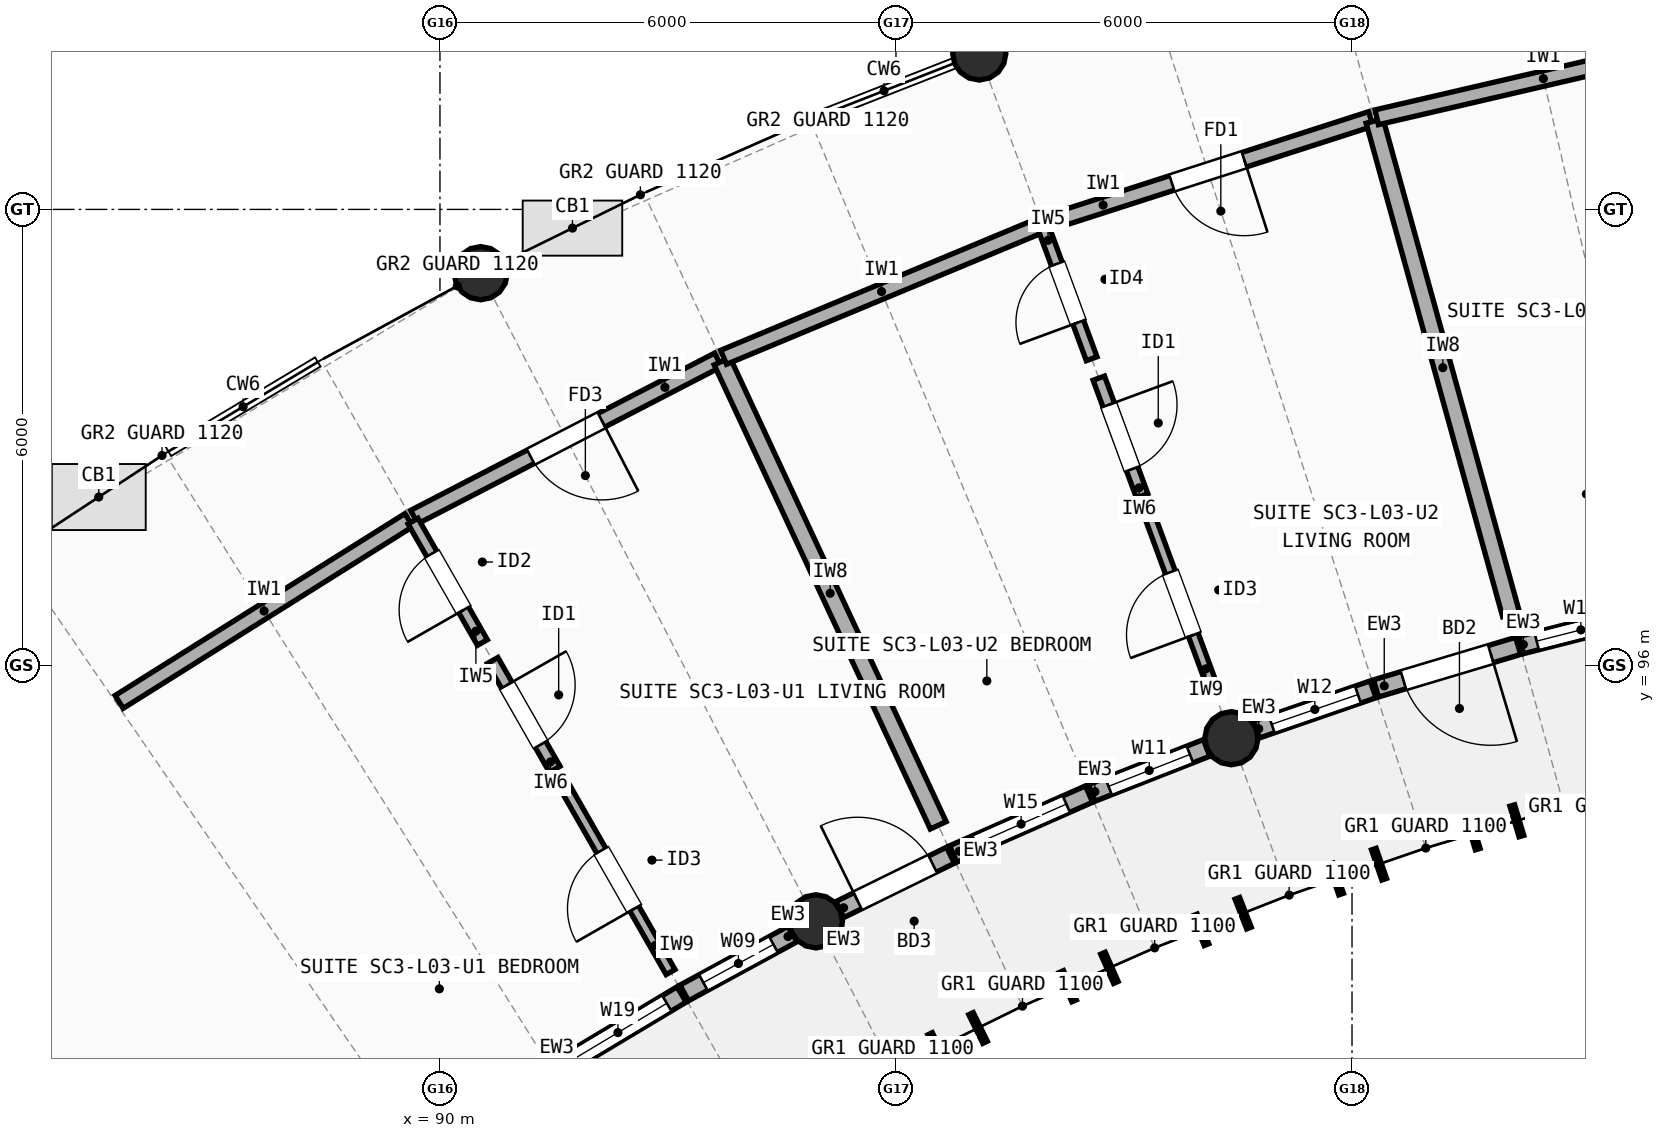
"""IFC4 building model, lengths in metres.
Left out: names, types, materials, properties, quantities, classifications, styles, units other than length and angle.
Written with IfcOpenShell. Run it as: python <this file> out.ifc"""

import sys

from ifc_helpers import new_model, si_unit, direction, frame, frame_2d, origin, origin_2d, place, context, subcontext, project, spatial, rectangle, circle, extrude, element, fill, save


model = new_model("IFC4")
c1 = context("Model", 3, precision=1e-05, world=origin(), true_north=direction((0.0, 1.0)))
c2 = subcontext(c1, "Body", "Model", "MODEL_VIEW")
j1 = project(units=[si_unit("LENGTHUNIT", "METRE"), si_unit("PLANEANGLEUNIT", "RADIAN")], contexts=[c1])
p1 = place(None, origin())
s1 = spatial("IfcSite", under=j1, at=p1, CompositionType="ELEMENT")
p2 = place(p1, origin())
s2 = spatial("IfcBuilding", under=s1, at=p2, CompositionType="ELEMENT")
p3 = place(p2, frame((0.0, 0.0, 10.9)))
s3 = spatial("IfcBuildingStorey", under=s2, at=p3, CompositionType="ELEMENT", Elevation=10.9)
for number, where, z_axis, x_axis in (
    (1, (94.947, 92.634, 0.0), (0.0, 0.0, 1.0), (1.0, 0.0, 0.0)),
    (2, (90.536, 101.161, 0.0), (0.0, 0.0, 1.0), (1.0, 0.0, 0.0)),
    (3, (100.413, 95.043, 0.0), (0.0, 0.0, 1.0), (1.0, 0.0, 0.0)),
    (4, (97.095, 104.052, 0.0), (0.0, 0.0, 1.0), (1.0, 0.0, 0.0)),
):
    element("IfcColumn", number, at=place(p3, frame(where, z_axis=z_axis, x_axis=x_axis)), inside=s3, PredefinedType="COLUMN", context=c2, shape_type="SweptSolid", body=[
        extrude(circle(Radius=0.35, at=origin_2d()), origin(), (0.0, 0.0, 1.0), 2.948),
    ])
p4 = place(p3, frame((91.504, 90.668, 0.0), z_axis=(0.0, 0.0, 1.0), x_axis=(0.85787888411, 0.51385194385, 0.0)))
e5 = element("IfcWall", 5, at=p4, inside=s3, PredefinedType="STANDARD", context=c2, shape_type="SweptSolid", body=[
    extrude(rectangle(XDim=1.952, YDim=0.235, at=frame_2d((0.976, 0.0))), origin(), (0.0, 0.0, 1.0), 2.684),
])
p5 = place(p4, frame((0.226, 0.0, 0.85)))
e6 = element("IfcOpeningElement", 6, at=p5, cuts=e5, PredefinedType="OPENING", context=c2, shape_type="SweptSolid", body=[
    extrude(rectangle(XDim=1.5, YDim=1.5, at=frame_2d((0.75, 0.75))), frame((0.0, 0.127, 0.0), z_axis=(0.0, -1.0, 0.0), x_axis=(1.0, 0.0, 0.0)), (0.0, 0.0, 1.0), 0.255),
])
p6 = place(p3, frame((93.214, 91.692, 0.0), z_axis=(0.0, 0.0, 1.0), x_axis=(0.878452871629, 0.477828999044, 0.0)))
e7 = element("IfcWall", 7, at=p6, inside=s3, PredefinedType="STANDARD", context=c2, shape_type="SweptSolid", body=[
    extrude(rectangle(XDim=1.622, YDim=0.235, at=frame_2d((0.811, 0.0))), origin(), (0.0, 0.0, 1.0), 2.684),
])
p7 = place(p6, frame((0.286, 0.0, 0.85)))
e8 = element("IfcOpeningElement", 8, at=p7, cuts=e7, PredefinedType="OPENING", context=c2, shape_type="SweptSolid", body=[
    extrude(rectangle(XDim=1.05, YDim=1.35, at=frame_2d((0.525, 0.675))), frame((0.0, 0.127, 0.0), z_axis=(0.0, -1.0, 0.0), x_axis=(1.0, 0.0, 0.0)), (0.0, 0.0, 1.0), 0.255),
])
p8 = place(p3, frame((95.261, 92.788, 0.0), z_axis=(0.0, 0.0, 1.0), x_axis=(0.897535518759, 0.440942164649, 0.0)))
e9 = element("IfcWall", 9, at=p8, inside=s3, PredefinedType="STANDARD", context=c2, shape_type="SweptSolid", body=[
    extrude(rectangle(XDim=1.622, YDim=0.235, at=frame_2d((0.811, 0.0))), origin(), (0.0, 0.0, 1.0), 2.684),
])
p9 = place(p8, frame((0.261, 0.0, 0.0)))
e10 = element("IfcOpeningElement", 10, at=p9, cuts=e9, PredefinedType="OPENING", context=c2, shape_type="SweptSolid", body=[
    extrude(rectangle(XDim=1.1, YDim=2.15, at=frame_2d((0.55, 1.075))), frame((0.0, 0.127, 0.0), z_axis=(0.0, -1.0, 0.0), x_axis=(1.0, 0.0, 0.0)), (0.0, 0.0, 1.0), 0.255),
])
p10 = place(p3, frame((96.753, 93.521, 0.0), z_axis=(0.0, 0.0, 1.0), x_axis=(0.915126852478, 0.403166025197, 0.0)))
e11 = element("IfcWall", 11, at=p10, inside=s3, PredefinedType="STANDARD", context=c2, shape_type="SweptSolid", body=[
    extrude(rectangle(XDim=1.952, YDim=0.235, at=frame_2d((0.976, 0.0))), origin(), (0.0, 0.0, 1.0), 2.684),
])
p11 = place(p10, frame((0.326, 0.0, 0.85)))
e12 = element("IfcOpeningElement", 12, at=p11, cuts=e11, PredefinedType="OPENING", context=c2, shape_type="SweptSolid", body=[
    extrude(rectangle(XDim=1.3, YDim=1.45, at=frame_2d((0.65, 0.725))), frame((0.0, 0.127, 0.0), z_axis=(0.0, -1.0, 0.0), x_axis=(1.0, 0.0, 0.0)), (0.0, 0.0, 1.0), 0.255),
])
p12 = place(p3, frame((98.577, 94.323, 0.0), z_axis=(0.0, 0.0, 1.0), x_axis=(0.930967180533, 0.365102874228, 0.0)))
e13 = element("IfcWall", 13, at=p12, inside=s3, PredefinedType="STANDARD", context=c2, shape_type="SweptSolid", body=[
    extrude(rectangle(XDim=1.622, YDim=0.235, at=frame_2d((0.811, 0.0))), origin(), (0.0, 0.0, 1.0), 2.684),
])
p13 = place(p12, frame((0.236, 0.0, 0.85)))
e14 = element("IfcOpeningElement", 14, at=p13, cuts=e13, PredefinedType="OPENING", context=c2, shape_type="SweptSolid", body=[
    extrude(rectangle(XDim=1.15, YDim=1.45, at=frame_2d((0.575, 0.725))), frame((0.0, 0.127, 0.0), z_axis=(0.0, -1.0, 0.0), x_axis=(1.0, 0.0, 0.0)), (0.0, 0.0, 1.0), 0.255),
])
p14 = place(p3, frame((100.744, 95.157, 0.0), z_axis=(0.0, 0.0, 1.0), x_axis=(0.945336194352, 0.32609734689, 0.0)))
e15 = element("IfcWall", 15, at=p14, inside=s3, PredefinedType="STANDARD", context=c2, shape_type="SweptSolid", body=[
    extrude(rectangle(XDim=1.622, YDim=0.235, at=frame_2d((0.811, 0.0))), origin(), (0.0, 0.0, 1.0), 2.684),
])
p15 = place(p14, frame((0.211, 0.0, 0.85)))
e16 = element("IfcOpeningElement", 16, at=p15, cuts=e15, PredefinedType="OPENING", context=c2, shape_type="SweptSolid", body=[
    extrude(rectangle(XDim=1.2, YDim=1.35, at=frame_2d((0.6, 0.675))), frame((0.0, 0.127, 0.0), z_axis=(0.0, -1.0, 0.0), x_axis=(1.0, 0.0, 0.0)), (0.0, 0.0, 1.0), 0.255),
])
p16 = place(p3, frame((102.316, 95.698, 0.0), z_axis=(0.0, 0.0, 1.0), x_axis=(0.95807718441, 0.286510224446, 0.0)))
e17 = element("IfcWall", 17, at=p16, inside=s3, PredefinedType="STANDARD", context=c2, shape_type="SweptSolid", body=[
    extrude(rectangle(XDim=1.952, YDim=0.235, at=frame_2d((0.976, 0.0))), origin(), (0.0, 0.0, 1.0), 2.684),
])
p17 = place(p16, frame((0.376, 0.0, 0.0)))
e18 = element("IfcOpeningElement", 18, at=p17, cuts=e17, PredefinedType="OPENING", context=c2, shape_type="SweptSolid", body=[
    extrude(rectangle(XDim=1.2, YDim=2.15, at=frame_2d((0.6, 1.075))), frame((0.0, 0.127, 0.0), z_axis=(0.0, -1.0, 0.0), x_axis=(1.0, 0.0, 0.0)), (0.0, 0.0, 1.0), 0.255),
])
p18 = place(p3, frame((104.225, 96.268, 0.0), z_axis=(0.0, 0.0, 1.0), x_axis=(0.969152085663, 0.246463455413, 0.0)))
e19 = element("IfcWall", 19, at=p18, inside=s3, PredefinedType="STANDARD", context=c2, shape_type="SweptSolid", body=[
    extrude(rectangle(XDim=1.623, YDim=0.235, at=frame_2d((0.811, 0.0))), origin(), (0.0, 0.0, 1.0), 2.684),
])
p19 = place(p18, frame((0.211, 0.0, 0.85)))
e20 = element("IfcOpeningElement", 20, at=p19, cuts=e19, PredefinedType="OPENING", context=c2, shape_type="SweptSolid", body=[
    extrude(rectangle(XDim=1.2, YDim=1.45, at=frame_2d((0.6, 0.725))), frame((0.0, 0.127, 0.0), z_axis=(0.0, -1.0, 0.0), x_axis=(1.0, 0.0, 0.0)), (0.0, 0.0, 1.0), 0.255),
])
p20 = place(p3, frame((85.779, 95.521, 0.0), z_axis=(0.0, 0.0, 1.0), x_axis=(0.847037081085, 0.531533802563, 0.0)))
e21 = element("IfcWall", 21, at=p20, inside=s3, PredefinedType="SOLIDWALL", context=c2, shape_type="SweptSolid", body=[
    extrude(rectangle(XDim=4.501, YDim=0.2, at=frame_2d((2.25, 0.0))), origin(), (0.0, 0.0, 1.0), 2.722),
])
p21 = place(p3, frame((89.661, 97.953, 0.0), z_axis=(0.0, 0.0, 1.0), x_axis=(0.888203141908, 0.459450953536, 0.0)))
e22 = element("IfcWall", 22, at=p21, inside=s3, PredefinedType="SOLIDWALL", context=c2, shape_type="SweptSolid", body=[
    extrude(rectangle(XDim=4.501, YDim=0.2, at=frame_2d((2.25, 0.0))), origin(), (0.0, 0.0, 1.0), 2.762),
])
p22 = place(p21, frame((1.726, 0.0, 0.0)))
e23 = element("IfcOpeningElement", 23, at=p22, cuts=e22, PredefinedType="OPENING", context=c2, shape_type="SweptSolid", body=[
    extrude(rectangle(XDim=1.05, YDim=2.15, at=frame_2d((0.525, 1.075))), frame((0.0, 0.11, 0.0), z_axis=(0.0, -1.0, 0.0), x_axis=(1.0, 0.0, 0.0)), (0.0, 0.0, 1.0), 0.22),
])
p23 = place(p3, frame((93.034, 91.967, 0.0), z_axis=(0.0, 0.0, 1.0), x_axis=(-0.495951127449, 0.868350435701, 0.0)))
e24 = element("IfcWall", 24, at=p23, inside=s3, PredefinedType="PARTITIONING", context=c2, shape_type="SweptSolid", body=[
    extrude(rectangle(XDim=2.8, YDim=0.135, at=frame_2d((1.4, 0.0))), origin(), (0.0, 0.0, 1.0), 2.742),
])
p24 = place(p23, frame((0.96, 0.0, 0.0)))
e25 = element("IfcOpeningElement", 25, at=p24, cuts=e24, PredefinedType="OPENING", context=c2, shape_type="SweptSolid", body=[
    extrude(rectangle(XDim=0.88, YDim=2.1, at=frame_2d((0.44, 1.05))), frame((0.0, 0.077, 0.0), z_axis=(0.0, -1.0, 0.0), x_axis=(1.0, 0.0, 0.0)), (0.0, 0.0, 1.0), 0.155),
])
p25 = place(p3, frame((91.51, 94.635, 0.0), z_axis=(0.0, 0.0, 1.0), x_axis=(-0.49583578404, 0.868416302971, 0.0)))
e26 = element("IfcWall", 26, at=p25, inside=s3, PredefinedType="PLUMBINGWALL", context=c2, shape_type="SweptSolid", body=[
    extrude(rectangle(XDim=1.648, YDim=0.16, at=frame_2d((0.824, 0.0))), origin(), (0.0, 0.0, 1.0), 2.742),
])
p26 = place(p25, frame((0.374, 0.0, 0.0)))
e27 = element("IfcOpeningElement", 27, at=p26, cuts=e26, PredefinedType="OPENING", context=c2, shape_type="SweptSolid", body=[
    extrude(rectangle(XDim=0.9, YDim=2.1, at=frame_2d((0.45, 1.05))), frame((0.0, 0.09, 0.0), z_axis=(0.0, -1.0, 0.0), x_axis=(1.0, 0.0, 0.0)), (0.0, 0.0, 1.0), 0.18),
])
p27 = place(p3, frame((90.558, 96.302, 0.0), z_axis=(0.0, 0.0, 1.0), x_axis=(-0.495938892217, 0.868357423638, 0.0)))
e28 = element("IfcWall", 28, at=p27, inside=s3, PredefinedType="PARTITIONING", context=c2, shape_type="SweptSolid", body=[
    extrude(rectangle(XDim=1.84, YDim=0.15, at=frame_2d((0.92, 0.0))), origin(), (0.0, 0.0, 1.0), 2.742),
])
p28 = place(p27, frame((0.495, 0.0, 0.0)))
e29 = element("IfcOpeningElement", 29, at=p28, cuts=e28, PredefinedType="OPENING", context=c2, shape_type="SweptSolid", body=[
    extrude(rectangle(XDim=0.85, YDim=2.1, at=frame_2d((0.425, 1.05))), frame((0.0, 0.085, 0.0), z_axis=(0.0, -1.0, 0.0), x_axis=(1.0, 0.0, 0.0)), (0.0, 0.0, 1.0), 0.17),
])
p29 = place(p3, frame((96.556, 93.897, 0.0), z_axis=(0.0, 0.0, 1.0), x_axis=(-0.422206763189, 0.906499558256, 0.0)))
e30 = element("IfcWall", 30, at=p29, inside=s3, PredefinedType="SOLIDWALL", context=c2, shape_type="SweptSolid", body=[
    extrude(rectangle(XDim=6.736, YDim=0.23, at=frame_2d((3.368, 0.0))), origin(), (0.0, 0.0, 1.0), 2.722),
])
p30 = place(p3, frame((93.732, 100.055, 0.0), z_axis=(0.0, 0.0, 1.0), x_axis=(0.923267760269, 0.384157054925, 0.0)))
e31 = element("IfcWall", 31, at=p30, inside=s3, PredefinedType="SOLIDWALL", context=c2, shape_type="SweptSolid", body=[
    extrude(rectangle(XDim=4.501, YDim=0.2, at=frame_2d((2.251, 0.0))), origin(), (0.0, 0.0, 1.0), 2.742),
])
p31 = place(p3, frame((97.963, 101.812, 0.0), z_axis=(0.0, 0.0, 1.0), x_axis=(0.95193992138, 0.306284812035, 0.0)))
e32 = element("IfcWall", 32, at=p31, inside=s3, PredefinedType="SOLIDWALL", context=c2, shape_type="SweptSolid", body=[
    extrude(rectangle(XDim=4.501, YDim=0.2, at=frame_2d((2.25, 0.0))), origin(), (0.0, 0.0, 1.0), 2.722),
])
p32 = place(p31, frame((1.751, 0.0, 0.0)))
e33 = element("IfcOpeningElement", 33, at=p32, cuts=e32, PredefinedType="OPENING", context=c2, shape_type="SweptSolid", body=[
    extrude(rectangle(XDim=1.0, YDim=2.15, at=frame_2d((0.5, 1.075))), frame((0.0, 0.11, 0.0), z_axis=(0.0, -1.0, 0.0), x_axis=(1.0, 0.0, 0.0)), (0.0, 0.0, 1.0), 0.22),
])
p33 = place(p3, frame((100.189, 95.651, 0.0), z_axis=(0.0, 0.0, 1.0), x_axis=(-0.34555023948, 0.938400251489, 0.0)))
e34 = element("IfcWall", 34, at=p33, inside=s3, PredefinedType="PARTITIONING", context=c2, shape_type="SweptSolid", body=[
    extrude(rectangle(XDim=2.48, YDim=0.135, at=frame_2d((1.24, 0.0))), origin(), (0.0, 0.0, 1.0), 2.762),
])
p34 = place(p33, frame((0.8, 0.0, 0.0)))
e35 = element("IfcOpeningElement", 35, at=p34, cuts=e34, PredefinedType="OPENING", context=c2, shape_type="SweptSolid", body=[
    extrude(rectangle(XDim=0.88, YDim=2.1, at=frame_2d((0.44, 1.05))), frame((0.0, 0.077, 0.0), z_axis=(0.0, -1.0, 0.0), x_axis=(1.0, 0.0, 0.0)), (0.0, 0.0, 1.0), 0.155),
])
p35 = place(p3, frame((99.238, 98.233, 0.0), z_axis=(0.0, 0.0, 1.0), x_axis=(-0.345581795697, 0.938388630836, 0.0)))
e36 = element("IfcWall", 36, at=p35, inside=s3, PredefinedType="PLUMBINGWALL", context=c2, shape_type="SweptSolid", body=[
    extrude(rectangle(XDim=1.648, YDim=0.16, at=frame_2d((0.824, 0.0))), origin(), (0.0, 0.0, 1.0), 2.762),
])
p36 = place(p35, frame((0.374, 0.0, 0.0)))
e37 = element("IfcOpeningElement", 37, at=p36, cuts=e36, PredefinedType="OPENING", context=c2, shape_type="SweptSolid", body=[
    extrude(rectangle(XDim=0.9, YDim=2.1, at=frame_2d((0.45, 1.05))), frame((0.0, 0.09, 0.0), z_axis=(0.0, -1.0, 0.0), x_axis=(1.0, 0.0, 0.0)), (0.0, 0.0, 1.0), 0.18),
])
p37 = place(p3, frame((98.574, 100.035, 0.0), z_axis=(0.0, 0.0, 1.0), x_axis=(-0.345490154584, 0.938422374566, 0.0)))
e38 = element("IfcWall", 38, at=p37, inside=s3, PredefinedType="PARTITIONING", context=c2, shape_type="SweptSolid", body=[
    extrude(rectangle(XDim=1.84, YDim=0.15, at=frame_2d((0.92, 0.0))), origin(), (0.0, 0.0, 1.0), 2.762),
])
p38 = place(p37, frame((0.51, 0.0, 0.0)))
e39 = element("IfcOpeningElement", 39, at=p38, cuts=e38, PredefinedType="OPENING", context=c2, shape_type="SweptSolid", body=[
    extrude(rectangle(XDim=0.82, YDim=2.08, at=frame_2d((0.41, 1.04))), frame((0.0, 0.085, 0.0), z_axis=(0.0, -1.0, 0.0), x_axis=(1.0, 0.0, 0.0)), (0.0, 0.0, 1.0), 0.17),
])
p39 = place(p3, frame((104.092, 96.672, 0.0), z_axis=(0.0, 0.0, 1.0), x_axis=(-0.266578174631, 0.963813299768, 0.0)))
e40 = element("IfcWall", 40, at=p39, inside=s3, PredefinedType="SOLIDWALL", context=c2, shape_type="SweptSolid", body=[
    extrude(rectangle(XDim=6.736, YDim=0.23, at=frame_2d((3.368, 0.0))), origin(), (0.0, 0.0, 1.0), 2.742),
])
p40 = place(p3, frame((102.325, 103.212, 0.0), z_axis=(0.0, 0.0, 1.0), x_axis=(0.974052809246, 0.226320844821, 0.0)))
e41 = element("IfcWall", 41, at=p40, inside=s3, PredefinedType="SOLIDWALL", context=c2, shape_type="SweptSolid", body=[
    extrude(rectangle(XDim=4.501, YDim=0.2, at=frame_2d((2.251, 0.0))), origin(), (0.0, 0.0, 1.0), 2.762),
])
p41 = place(p5, origin())
e42 = element("IfcWindow", 42, at=p41, inside=s3, PartitioningType="SINGLE_PANEL", PredefinedType="WINDOW", context=c2, shape_type="SweptSolid", body=[
    extrude(rectangle(XDim=1.5, YDim=1.5, at=frame_2d((0.75, 0.75))), frame((0.0, 0.03, 0.0), z_axis=(0.0, -1.0, 0.0), x_axis=(1.0, 0.0, 0.0)), (0.0, 0.0, 1.0), 0.06),
])
fill(e6, e42)
p42 = place(p7, origin())
e43 = element("IfcWindow", 43, at=p42, inside=s3, PartitioningType="SINGLE_PANEL", PredefinedType="WINDOW", context=c2, shape_type="SweptSolid", body=[
    extrude(rectangle(XDim=1.05, YDim=1.35, at=frame_2d((0.525, 0.675))), frame((0.0, 0.03, 0.0), z_axis=(0.0, -1.0, 0.0), x_axis=(1.0, 0.0, 0.0)), (0.0, 0.0, 1.0), 0.06),
])
fill(e8, e43)
p43 = place(p9, frame((1.1, 0.0, 0.0), z_axis=(0.0, 0.0, 1.0), x_axis=(-1.0, 0.0, 0.0)))
e44 = element("IfcDoor", 44, at=p43, inside=s3, OperationType="SINGLE_SWING_LEFT", PredefinedType="DOOR", context=c2, shape_type="SweptSolid", body=[
    extrude(rectangle(XDim=1.1, YDim=2.15, at=frame_2d((0.55, 1.075))), frame((0.0, 0.025, 0.0), z_axis=(0.0, -1.0, 0.0), x_axis=(1.0, 0.0, 0.0)), (0.0, 0.0, 1.0), 0.05),
])
fill(e10, e44)
p44 = place(p11, origin())
e45 = element("IfcWindow", 45, at=p44, inside=s3, PartitioningType="SINGLE_PANEL", PredefinedType="WINDOW", context=c2, shape_type="SweptSolid", body=[
    extrude(rectangle(XDim=1.3, YDim=1.45, at=frame_2d((0.65, 0.725))), frame((0.0, 0.03, 0.0), z_axis=(0.0, -1.0, 0.0), x_axis=(1.0, 0.0, 0.0)), (0.0, 0.0, 1.0), 0.06),
])
fill(e12, e45)
p45 = place(p13, origin())
e46 = element("IfcWindow", 46, at=p45, inside=s3, PartitioningType="SINGLE_PANEL", PredefinedType="WINDOW", context=c2, shape_type="SweptSolid", body=[
    extrude(rectangle(XDim=1.15, YDim=1.45, at=frame_2d((0.575, 0.725))), frame((0.0, 0.03, 0.0), z_axis=(0.0, -1.0, 0.0), x_axis=(1.0, 0.0, 0.0)), (0.0, 0.0, 1.0), 0.06),
])
fill(e14, e46)
p46 = place(p15, origin())
e47 = element("IfcWindow", 47, at=p46, inside=s3, PartitioningType="SINGLE_PANEL", PredefinedType="WINDOW", context=c2, shape_type="SweptSolid", body=[
    extrude(rectangle(XDim=1.2, YDim=1.35, at=frame_2d((0.6, 0.675))), frame((0.0, 0.03, 0.0), z_axis=(0.0, -1.0, 0.0), x_axis=(1.0, 0.0, 0.0)), (0.0, 0.0, 1.0), 0.06),
])
fill(e16, e47)
p47 = place(p17, frame((1.2, 0.0, 0.0), z_axis=(0.0, 0.0, 1.0), x_axis=(-1.0, 0.0, 0.0)))
e48 = element("IfcDoor", 48, at=p47, inside=s3, OperationType="SINGLE_SWING_RIGHT", PredefinedType="DOOR", context=c2, shape_type="SweptSolid", body=[
    extrude(rectangle(XDim=1.2, YDim=2.15, at=frame_2d((0.6, 1.075))), frame((0.0, 0.025, 0.0), z_axis=(0.0, -1.0, 0.0), x_axis=(1.0, 0.0, 0.0)), (0.0, 0.0, 1.0), 0.05),
])
fill(e18, e48)
p48 = place(p19, origin())
e49 = element("IfcWindow", 49, at=p48, inside=s3, PartitioningType="SINGLE_PANEL", PredefinedType="WINDOW", context=c2, shape_type="SweptSolid", body=[
    extrude(rectangle(XDim=1.2, YDim=1.45, at=frame_2d((0.6, 0.725))), frame((0.0, 0.03, 0.0), z_axis=(0.0, -1.0, 0.0), x_axis=(1.0, 0.0, 0.0)), (0.0, 0.0, 1.0), 0.06),
])
fill(e20, e49)
p49 = place(p22, origin())
e50 = element("IfcDoor", 50, at=p49, inside=s3, OperationType="SINGLE_SWING_RIGHT", PredefinedType="DOOR", context=c2, shape_type="SweptSolid", body=[
    extrude(rectangle(XDim=1.05, YDim=2.15, at=frame_2d((0.525, 1.075))), frame((0.0, 0.025, 0.0), z_axis=(0.0, -1.0, 0.0), x_axis=(1.0, 0.0, 0.0)), (0.0, 0.0, 1.0), 0.05),
])
fill(e23, e50)
p50 = place(p24, origin())
e51 = element("IfcDoor", 51, at=p50, inside=s3, OperationType="SINGLE_SWING_LEFT", PredefinedType="DOOR", context=c2, shape_type="SweptSolid", body=[
    extrude(rectangle(XDim=0.88, YDim=2.1, at=frame_2d((0.44, 1.05))), frame((0.0, 0.025, 0.0), z_axis=(0.0, -1.0, 0.0), x_axis=(1.0, 0.0, 0.0)), (0.0, 0.0, 1.0), 0.05),
])
fill(e25, e51)
p51 = place(p26, origin())
e52 = element("IfcDoor", 52, at=p51, inside=s3, OperationType="SINGLE_SWING_RIGHT", PredefinedType="DOOR", context=c2, shape_type="SweptSolid", body=[
    extrude(rectangle(XDim=0.9, YDim=2.1, at=frame_2d((0.45, 1.05))), frame((0.0, 0.025, 0.0), z_axis=(0.0, -1.0, 0.0), x_axis=(1.0, 0.0, 0.0)), (0.0, 0.0, 1.0), 0.05),
])
fill(e27, e52)
p52 = place(p28, origin())
e53 = element("IfcDoor", 53, at=p52, inside=s3, OperationType="SINGLE_SWING_LEFT", PredefinedType="DOOR", context=c2, shape_type="SweptSolid", body=[
    extrude(rectangle(XDim=0.85, YDim=2.1, at=frame_2d((0.425, 1.05))), frame((0.0, 0.025, 0.0), z_axis=(0.0, -1.0, 0.0), x_axis=(1.0, 0.0, 0.0)), (0.0, 0.0, 1.0), 0.05),
])
fill(e29, e53)
p53 = place(p32, origin())
e54 = element("IfcDoor", 54, at=p53, inside=s3, OperationType="SINGLE_SWING_RIGHT", PredefinedType="DOOR", context=c2, shape_type="SweptSolid", body=[
    extrude(rectangle(XDim=1.0, YDim=2.15, at=frame_2d((0.5, 1.075))), frame((0.0, 0.025, 0.0), z_axis=(0.0, -1.0, 0.0), x_axis=(1.0, 0.0, 0.0)), (0.0, 0.0, 1.0), 0.05),
])
fill(e33, e54)
p54 = place(p34, origin())
e55 = element("IfcDoor", 55, at=p54, inside=s3, OperationType="SINGLE_SWING_LEFT", PredefinedType="DOOR", context=c2, shape_type="SweptSolid", body=[
    extrude(rectangle(XDim=0.88, YDim=2.1, at=frame_2d((0.44, 1.05))), frame((0.0, 0.025, 0.0), z_axis=(0.0, -1.0, 0.0), x_axis=(1.0, 0.0, 0.0)), (0.0, 0.0, 1.0), 0.05),
])
fill(e35, e55)
p55 = place(p36, origin())
e56 = element("IfcDoor", 56, at=p55, inside=s3, OperationType="SINGLE_SWING_RIGHT", PredefinedType="DOOR", context=c2, shape_type="SweptSolid", body=[
    extrude(rectangle(XDim=0.9, YDim=2.1, at=frame_2d((0.45, 1.05))), frame((0.0, 0.025, 0.0), z_axis=(0.0, -1.0, 0.0), x_axis=(1.0, 0.0, 0.0)), (0.0, 0.0, 1.0), 0.05),
])
fill(e37, e56)
p56 = place(p38, origin())
e57 = element("IfcDoor", 57, at=p56, inside=s3, OperationType="SINGLE_SWING_LEFT", PredefinedType="DOOR", context=c2, shape_type="SweptSolid", body=[
    extrude(rectangle(XDim=0.82, YDim=2.08, at=frame_2d((0.41, 1.04))), frame((0.0, 0.025, 0.0), z_axis=(0.0, -1.0, 0.0), x_axis=(1.0, 0.0, 0.0)), (0.0, 0.0, 1.0), 0.05),
])
fill(e39, e57)
save(model, sys.argv[1])
